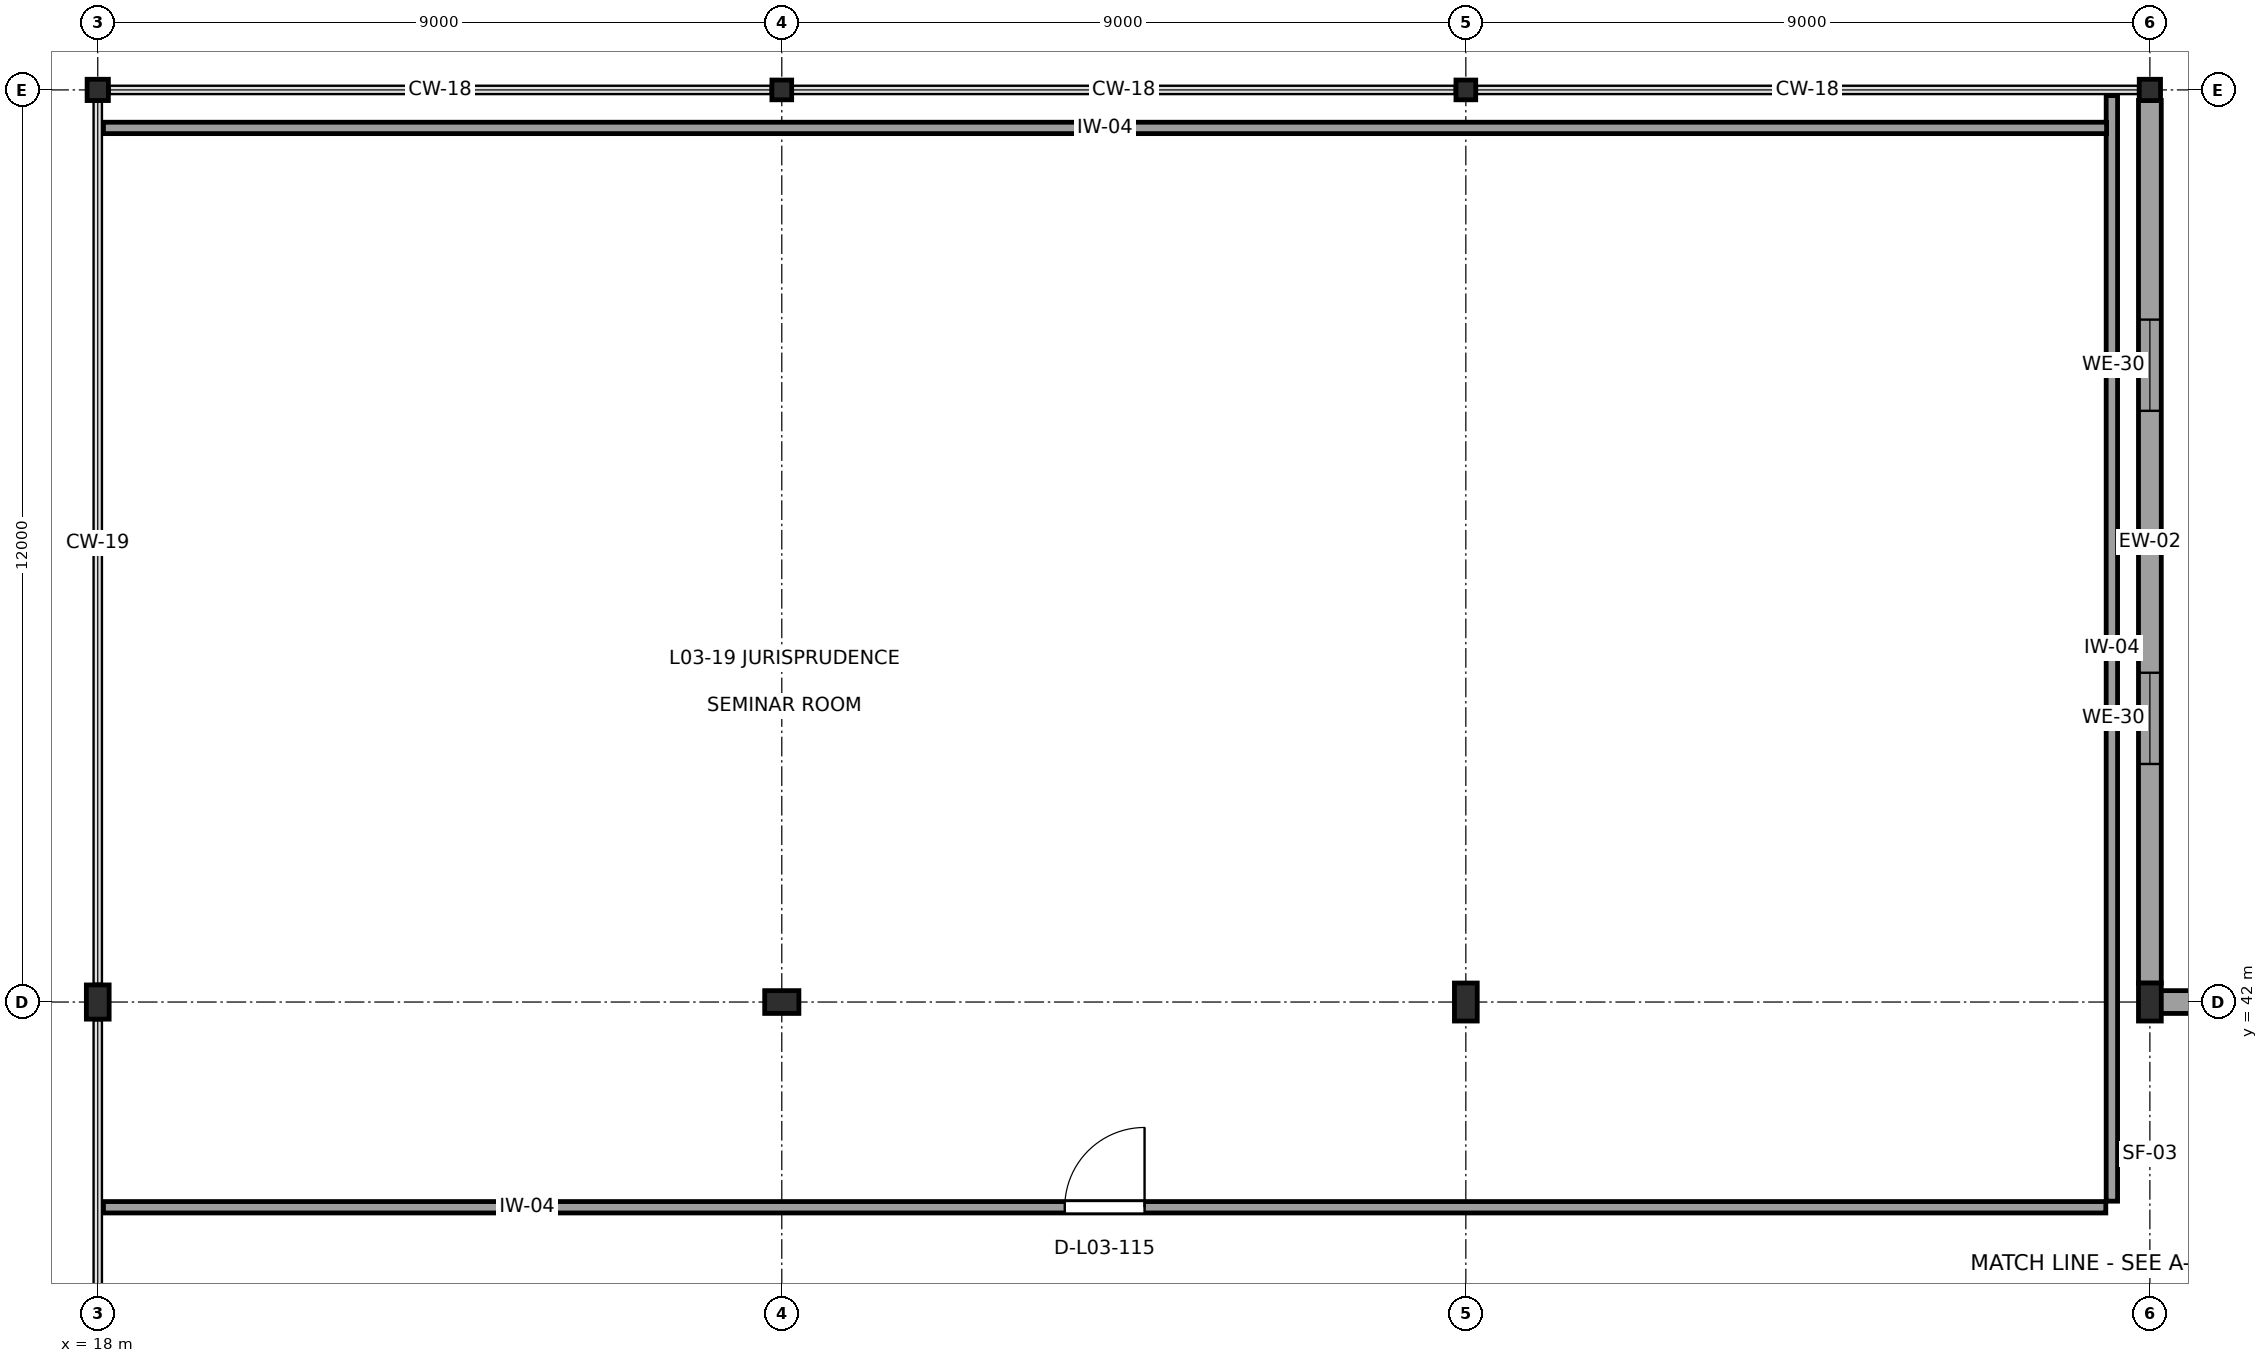
"""IFC4 building model, lengths in metres.
Left out: names, types, materials, properties, quantities, classifications, styles, units other than length and angle.
Written with IfcOpenShell. Run it as: python <this file> out.ifc"""

import sys

from ifc_helpers import new_model, si_unit, direction, frame, frame_2d, origin, origin_2d, place, context, subcontext, project, spatial, rectangle, i_section, extrude, element, fill, save


model = new_model("IFC4")
c1 = context("Model", 3, precision=1e-05, world=origin(), true_north=direction((0.0, 1.0)))
c2 = subcontext(c1, "Body", "Model", "MODEL_VIEW")
j1 = project(units=[si_unit("LENGTHUNIT", "METRE"), si_unit("PLANEANGLEUNIT", "RADIAN")], contexts=[c1])
p1 = place(None, origin())
s1 = spatial("IfcSite", under=j1, at=p1, CompositionType="ELEMENT")
p2 = place(p1, origin())
s2 = spatial("IfcBuilding", under=s1, at=p2, CompositionType="ELEMENT")
p3 = place(p2, frame((0.0, 0.0, 14.4)))
s3 = spatial("IfcBuildingStorey", under=s2, at=p3, CompositionType="ELEMENT", Elevation=14.4)
p4 = place(p3, frame((18.0, 42.0, 0.0), z_axis=(0.0, 0.0, 1.0), x_axis=(1.0, 0.0, 0.0)))
e1 = element("IfcColumn", 1, at=p4, inside=s3, PredefinedType="COLUMN", context=c2, shape_type="SweptSolid", body=[
    extrude(i_section(OverallWidth=0.3, OverallDepth=0.45, WebThickness=0.014, FlangeThickness=0.026, at=origin_2d()), origin(), (0.0, 0.0, 1.0), 4.3),
])
p5 = place(p3, frame((18.0, 54.0, 0.0), z_axis=(0.0, 0.0, 1.0), x_axis=(1.0, 0.0, 0.0)))
e2 = element("IfcColumn", 2, at=p5, inside=s3, PredefinedType="COLUMN", context=c2, shape_type="SweptSolid", body=[
    extrude(i_section(OverallWidth=0.28, OverallDepth=0.28, WebThickness=0.01, FlangeThickness=0.018, at=origin_2d()), origin(), (0.0, 0.0, 1.0), 4.3),
])
p6 = place(p3, frame((27.0, 42.0, 0.0), z_axis=(0.0, 0.0, 1.0), x_axis=(0.0, 1.0, 0.0)))
e3 = element("IfcColumn", 3, at=p6, inside=s3, PredefinedType="COLUMN", context=c2, shape_type="SweptSolid", body=[
    extrude(i_section(OverallWidth=0.3, OverallDepth=0.45, WebThickness=0.014, FlangeThickness=0.026, at=origin_2d()), origin(), (0.0, 0.0, 1.0), 4.3),
])
p7 = place(p3, frame((27.0, 54.0, 0.0), z_axis=(0.0, 0.0, 1.0), x_axis=(1.0, 0.0, 0.0)))
e4 = element("IfcColumn", 4, at=p7, inside=s3, PredefinedType="COLUMN", context=c2, shape_type="SweptSolid", body=[
    extrude(i_section(OverallWidth=0.26, OverallDepth=0.26, WebThickness=0.01, FlangeThickness=0.018, at=origin_2d()), origin(), (0.0, 0.0, 1.0), 4.3),
])
p8 = place(p3, frame((36.0, 42.0, 0.0), z_axis=(0.0, 0.0, 1.0), x_axis=(1.0, 0.0, 0.0)))
e5 = element("IfcColumn", 5, at=p8, inside=s3, PredefinedType="COLUMN", context=c2, shape_type="SweptSolid", body=[
    extrude(i_section(OverallWidth=0.3, OverallDepth=0.5, WebThickness=0.014, FlangeThickness=0.028, at=origin_2d()), origin(), (0.0, 0.0, 1.0), 4.3),
])
p9 = place(p3, frame((36.0, 54.0, 0.0), z_axis=(0.0, 0.0, 1.0), x_axis=(1.0, 0.0, 0.0)))
e6 = element("IfcColumn", 6, at=p9, inside=s3, PredefinedType="COLUMN", context=c2, shape_type="SweptSolid", body=[
    extrude(i_section(OverallWidth=0.26, OverallDepth=0.26, WebThickness=0.01, FlangeThickness=0.018, at=origin_2d()), origin(), (0.0, 0.0, 1.0), 4.3),
])
p10 = place(p3, frame((45.0, 42.0, 0.0), z_axis=(0.0, 0.0, 1.0), x_axis=(1.0, 0.0, 0.0)))
e7 = element("IfcColumn", 7, at=p10, inside=s3, PredefinedType="COLUMN", context=c2, shape_type="SweptSolid", body=[
    extrude(i_section(OverallWidth=0.3, OverallDepth=0.5, WebThickness=0.014, FlangeThickness=0.028, at=origin_2d()), origin(), (0.0, 0.0, 1.0), 4.3),
])
p11 = place(p3, frame((45.0, 54.0, 0.0), z_axis=(0.0, 0.0, 1.0), x_axis=(1.0, 0.0, 0.0)))
e8 = element("IfcColumn", 8, at=p11, inside=s3, PredefinedType="COLUMN", context=c2, shape_type="SweptSolid", body=[
    extrude(i_section(OverallWidth=0.28, OverallDepth=0.28, WebThickness=0.01, FlangeThickness=0.018, at=origin_2d()), origin(), (0.0, 0.0, 1.0), 4.3),
])
p12 = place(p3, frame((53.992, 42.0, 0.0), z_axis=(0.0, 0.0, 1.0), x_axis=(-1.0, 0.0, 0.0)))
e9 = element("IfcWall", 9, at=p12, inside=s3, PredefinedType="SOLIDWALL", context=c2, shape_type="SweptSolid", body=[
    extrude(rectangle(XDim=8.984, YDim=0.3, at=frame_2d((4.492, 0.0))), origin(), (0.0, 0.0, 1.0), 3.595),
])
p13 = place(p3, frame((45.0, 42.248, 0.0), z_axis=(0.0, 0.0, 1.0), x_axis=(0.0, 1.0, 0.0)))
e10 = element("IfcWall", 10, at=p13, inside=s3, PredefinedType="SOLIDWALL", context=c2, shape_type="SweptSolid", body=[
    extrude(rectangle(XDim=11.614, YDim=0.3, at=frame_2d((5.807, 0.0))), origin(), (0.0, 0.0, 1.0), 3.805),
])
p14 = place(p13, frame((2.884, 0.0, 0.85)))
e11 = element("IfcOpeningElement", 11, at=p14, cuts=e10, PredefinedType="OPENING", context=c2, shape_type="SweptSolid", body=[
    extrude(rectangle(XDim=1.2, YDim=0.7, at=frame_2d((0.6, 0.35))), frame((0.0, 0.165, 0.0), z_axis=(0.0, -1.0, 0.0), x_axis=(1.0, 0.0, 0.0)), (0.0, 0.0, 1.0), 0.33),
])
p15 = place(p13, frame((7.53, 0.0, 0.85)))
e12 = element("IfcOpeningElement", 12, at=p15, cuts=e10, PredefinedType="OPENING", context=c2, shape_type="SweptSolid", body=[
    extrude(rectangle(XDim=1.2, YDim=0.7, at=frame_2d((0.6, 0.35))), frame((0.0, 0.165, 0.0), z_axis=(0.0, -1.0, 0.0), x_axis=(1.0, 0.0, 0.0)), (0.0, 0.0, 1.0), 0.33),
])
p16 = place(p3, frame((44.5, 53.925, 0.0), z_axis=(0.0, 0.0, 1.0), x_axis=(0.0, -1.0, 0.0)))
e13 = element("IfcWall", 13, at=p16, inside=s3, PredefinedType="PARTITIONING", context=c2, shape_type="SweptSolid", body=[
    extrude(rectangle(XDim=14.545, YDim=0.15, at=frame_2d((7.272, 0.0))), origin(), (0.0, 0.0, 1.0), 4.14),
])
p17 = place(p3, frame((44.42, 39.3, 0.0), z_axis=(0.0, 0.0, 1.0), x_axis=(-1.0, 0.0, 0.0)))
e14 = element("IfcWall", 14, at=p17, inside=s3, PredefinedType="PARTITIONING", context=c2, shape_type="SweptSolid", body=[
    extrude(rectangle(XDim=26.345, YDim=0.15, at=frame_2d((13.172, 0.0))), origin(), (0.0, 0.0, 1.0), 4.14),
])
p18 = place(p17, frame((12.647, 0.0, 0.0)))
e15 = element("IfcOpeningElement", 15, at=p18, cuts=e14, PredefinedType="OPENING", context=c2, shape_type="SweptSolid", body=[
    extrude(rectangle(XDim=1.05, YDim=2.25, at=frame_2d((0.525, 1.125))), frame((0.0, 0.09, 0.0), z_axis=(0.0, -1.0, 0.0), x_axis=(1.0, 0.0, 0.0)), (0.0, 0.0, 1.0), 0.18),
])
p19 = place(p3, frame((18.075, 53.5, 0.0), z_axis=(0.0, 0.0, 1.0), x_axis=(1.0, 0.0, 0.0)))
e16 = element("IfcWall", 16, at=p19, inside=s3, PredefinedType="PARTITIONING", context=c2, shape_type="SweptSolid", body=[
    extrude(rectangle(XDim=26.355, YDim=0.15, at=frame_2d((13.177, 0.0))), origin(), (0.0, 0.0, 1.0), 4.14),
])
p20 = place(p14, origin())
e17 = element("IfcWindow", 17, at=p20, inside=s3, PartitioningType="SINGLE_PANEL", PredefinedType="WINDOW", context=c2, shape_type="SweptSolid", body=[
    extrude(rectangle(XDim=1.2, YDim=0.7, at=frame_2d((0.6, 0.35))), frame((0.0, 0.03, 0.0), z_axis=(0.0, -1.0, 0.0), x_axis=(1.0, 0.0, 0.0)), (0.0, 0.0, 1.0), 0.06),
])
fill(e11, e17)
p21 = place(p15, origin())
e18 = element("IfcWindow", 18, at=p21, inside=s3, PartitioningType="SINGLE_PANEL", PredefinedType="WINDOW", context=c2, shape_type="SweptSolid", body=[
    extrude(rectangle(XDim=1.2, YDim=0.7, at=frame_2d((0.6, 0.35))), frame((0.0, 0.03, 0.0), z_axis=(0.0, -1.0, 0.0), x_axis=(1.0, 0.0, 0.0)), (0.0, 0.0, 1.0), 0.06),
])
fill(e12, e18)
p22 = place(p18, frame((1.05, 0.0, 0.0), z_axis=(0.0, 0.0, 1.0), x_axis=(-1.0, 0.0, 0.0)))
e19 = element("IfcDoor", 19, at=p22, inside=s3, OperationType="SINGLE_SWING_LEFT", PredefinedType="DOOR", context=c2, shape_type="SweptSolid", body=[
    extrude(rectangle(XDim=1.05, YDim=2.25, at=frame_2d((0.525, 1.125))), frame((0.0, 0.025, 0.0), z_axis=(0.0, -1.0, 0.0), x_axis=(1.0, 0.0, 0.0)), (0.0, 0.0, 1.0), 0.05),
])
fill(e15, e19)
save(model, sys.argv[1])
